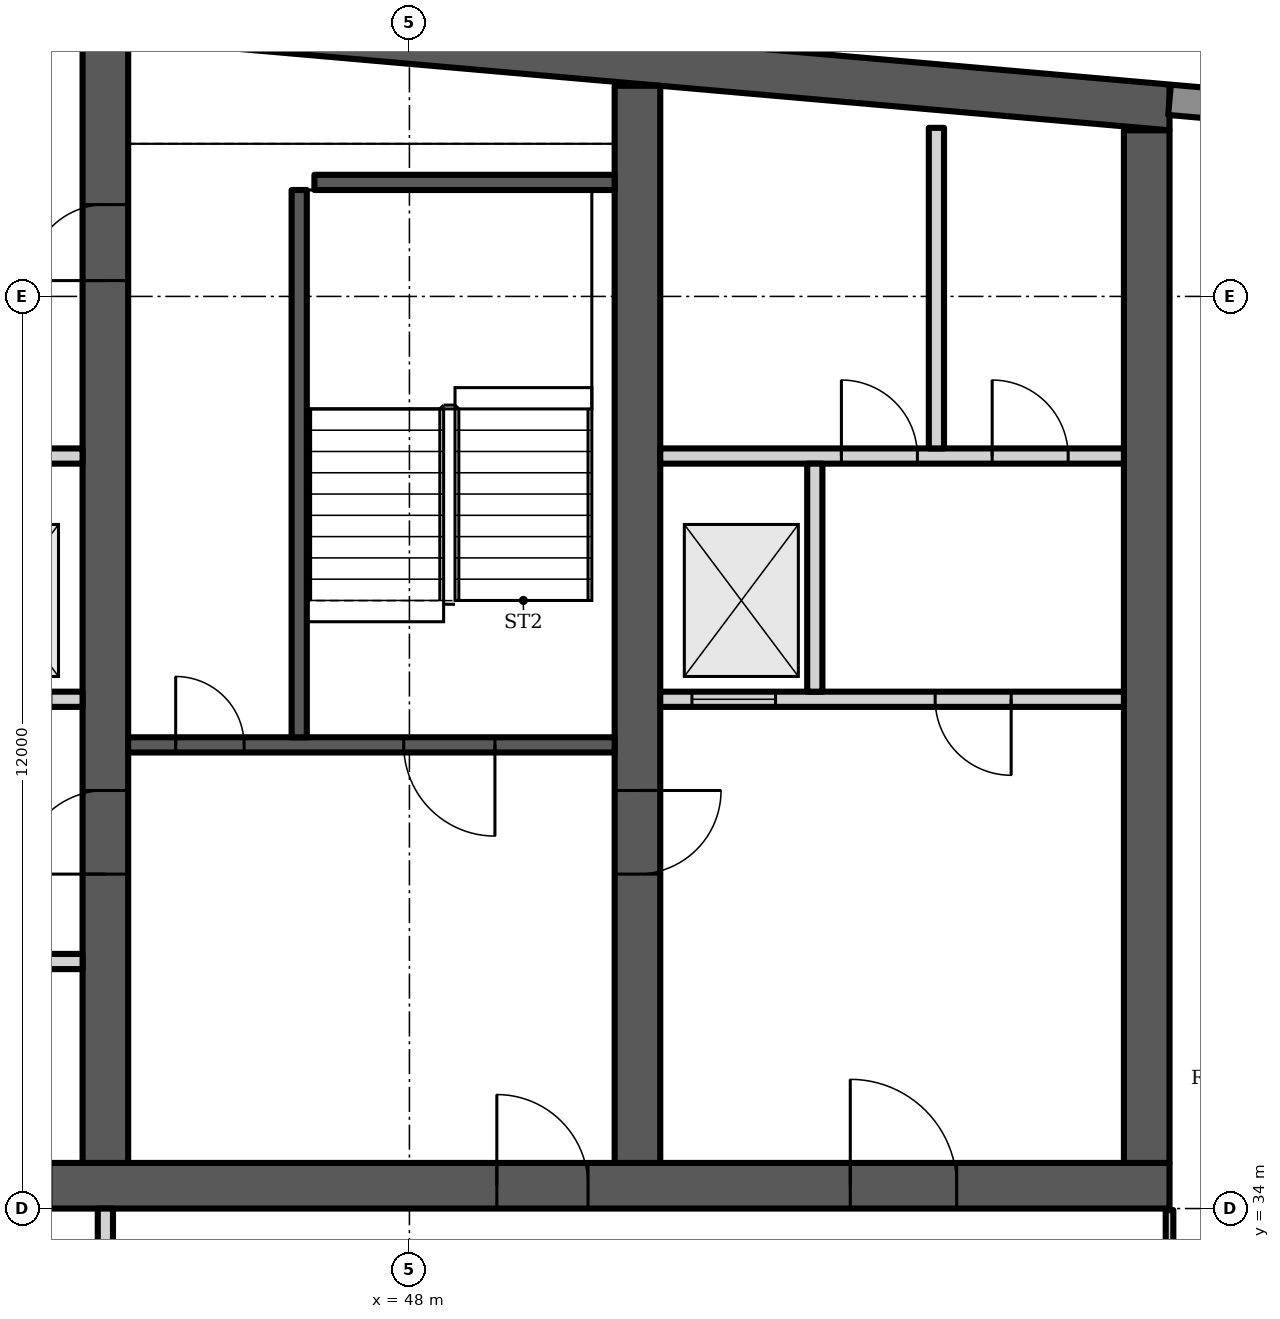
"""IFC4 building model, lengths in metres.
Left out: names, types, materials, properties, quantities, classifications, styles, units other than length and angle.
Written with IfcOpenShell. Run it as: python <this file> out.ifc"""

import sys

from ifc_helpers import new_model, si_unit, direction, frame, frame_2d, origin, place, context, subcontext, project, spatial, polyline, rectangle, outline, extrude, element, fill, save


model = new_model("IFC4")
c1 = context("Model", 3, precision=1e-05, world=origin(), true_north=direction((0.0, 1.0)))
c2 = subcontext(c1, "Body", "Model", "MODEL_VIEW")
j1 = project(units=[si_unit("LENGTHUNIT", "METRE"), si_unit("PLANEANGLEUNIT", "RADIAN")], contexts=[c1])
p1 = place(None, origin())
s1 = spatial("IfcSite", under=j1, at=p1, CompositionType="ELEMENT")
p2 = place(p1, origin())
s2 = spatial("IfcBuilding", under=s1, at=p2, CompositionType="ELEMENT")
p3 = place(p2, frame((0.0, 0.0, 257.5)))
s3 = spatial("IfcBuildingStorey", under=s2, at=p3, CompositionType="ELEMENT", Elevation=257.5)
p4 = place(p3, origin())
e1 = element("IfcWall", 1, at=p4, inside=s3, PredefinedType="SHEAR", context=c2, shape_type="SweptSolid", body=[
    extrude(outline(polyline([(23.0, 48.185), (40.5, 49.716), (58.0, 48.185), (58.0, 48.787), (40.5, 50.318), (23.0, 48.787), (23.0, 48.185)])), origin(), (0.0, 0.0, 1.0), 3.6),
])
p5 = place(p3, frame((23.0, 34.3, 0.0), z_axis=(0.0, 0.0, 1.0), x_axis=(1.0, 0.0, 0.0)))
e2 = element("IfcWall", 2, at=p5, inside=s3, PredefinedType="SHEAR", context=c2, shape_type="SweptSolid", body=[
    extrude(rectangle(XDim=35.0, YDim=0.6, at=frame_2d((17.5, 0.0))), origin(), (0.0, 0.0, 1.0), 3.6),
])
p6 = place(p5, frame((0.65, 0.0, 0.0)))
e3 = element("IfcOpeningElement", 3, at=p6, cuts=e2, PredefinedType="OPENING", context=c2, shape_type="SweptSolid", body=[
    extrude(rectangle(XDim=1.2, YDim=2.1, at=frame_2d((0.6, 1.05))), frame((0.0, 0.31, 0.0), z_axis=(0.0, -1.0, 0.0), x_axis=(1.0, 0.0, 0.0)), (0.0, 0.0, 1.0), 0.62),
])
p7 = place(p5, frame((7.717, 0.0, 0.0)))
e4 = element("IfcOpeningElement", 4, at=p7, cuts=e2, PredefinedType="OPENING", context=c2, shape_type="SweptSolid", body=[
    extrude(rectangle(XDim=1.1, YDim=2.1, at=frame_2d((0.55, 1.05))), frame((0.0, 0.31, 0.0), z_axis=(0.0, -1.0, 0.0), x_axis=(1.0, 0.0, 0.0)), (0.0, 0.0, 1.0), 0.62),
])
p8 = place(p5, frame((12.183, 0.0, 0.0)))
e5 = element("IfcOpeningElement", 5, at=p8, cuts=e2, PredefinedType="OPENING", context=c2, shape_type="SweptSolid", body=[
    extrude(rectangle(XDim=1.1, YDim=2.1, at=frame_2d((0.55, 1.05))), frame((0.0, 0.31, 0.0), z_axis=(0.0, -1.0, 0.0), x_axis=(1.0, 0.0, 0.0)), (0.0, 0.0, 1.0), 0.62),
])
p9 = place(p5, frame((9.8, 0.0, 0.0)))
e6 = element("IfcOpeningElement", 6, at=p9, cuts=e2, PredefinedType="OPENING", context=c2, shape_type="SweptSolid", body=[
    extrude(rectangle(XDim=1.4, YDim=2.1, at=frame_2d((0.7, 1.05))), frame((0.0, 0.31, 0.0), z_axis=(0.0, -1.0, 0.0), x_axis=(1.0, 0.0, 0.0)), (0.0, 0.0, 1.0), 0.62),
])
p10 = place(p5, frame((14.717, 0.0, 0.0)))
e7 = element("IfcOpeningElement", 7, at=p10, cuts=e2, PredefinedType="OPENING", context=c2, shape_type="SweptSolid", body=[
    extrude(rectangle(XDim=1.1, YDim=2.1, at=frame_2d((0.55, 1.05))), frame((0.0, 0.31, 0.0), z_axis=(0.0, -1.0, 0.0), x_axis=(1.0, 0.0, 0.0)), (0.0, 0.0, 1.0), 0.62),
])
p11 = place(p5, frame((16.95, 0.0, 0.0)))
e8 = element("IfcOpeningElement", 8, at=p11, cuts=e2, PredefinedType="OPENING", context=c2, shape_type="SweptSolid", body=[
    extrude(rectangle(XDim=1.1, YDim=2.1, at=frame_2d((0.55, 1.05))), frame((0.0, 0.31, 0.0), z_axis=(0.0, -1.0, 0.0), x_axis=(1.0, 0.0, 0.0)), (0.0, 0.0, 1.0), 0.62),
])
p12 = place(p5, frame((19.183, 0.0, 0.0)))
e9 = element("IfcOpeningElement", 9, at=p12, cuts=e2, PredefinedType="OPENING", context=c2, shape_type="SweptSolid", body=[
    extrude(rectangle(XDim=1.1, YDim=2.1, at=frame_2d((0.55, 1.05))), frame((0.0, 0.31, 0.0), z_axis=(0.0, -1.0, 0.0), x_axis=(1.0, 0.0, 0.0)), (0.0, 0.0, 1.0), 0.62),
])
p13 = place(p5, frame((26.15, 0.0, 0.0)))
e10 = element("IfcOpeningElement", 10, at=p13, cuts=e2, PredefinedType="OPENING", context=c2, shape_type="SweptSolid", body=[
    extrude(rectangle(XDim=1.2, YDim=2.1, at=frame_2d((0.6, 1.05))), frame((0.0, 0.31, 0.0), z_axis=(0.0, -1.0, 0.0), x_axis=(1.0, 0.0, 0.0)), (0.0, 0.0, 1.0), 0.62),
])
p14 = place(p5, frame((30.8, 0.0, 0.0)))
e11 = element("IfcOpeningElement", 11, at=p14, cuts=e2, PredefinedType="OPENING", context=c2, shape_type="SweptSolid", body=[
    extrude(rectangle(XDim=1.4, YDim=2.1, at=frame_2d((0.7, 1.05))), frame((0.0, 0.31, 0.0), z_axis=(0.0, -1.0, 0.0), x_axis=(1.0, 0.0, 0.0)), (0.0, 0.0, 1.0), 0.62),
])
p15 = place(p3, frame((44.0, 34.6, 0.0), z_axis=(0.0, 0.0, 1.0), x_axis=(0.0, 1.0, 0.0)))
e12 = element("IfcWall", 12, at=p15, inside=s3, PredefinedType="SHEAR", context=c2, shape_type="SweptSolid", body=[
    extrude(rectangle(XDim=14.784, YDim=0.6, at=frame_2d((7.392, 0.0))), origin(), (0.0, 0.0, 1.0), 3.6),
])
p16 = place(p15, frame((11.608, 0.0, 0.0)))
e13 = element("IfcOpeningElement", 13, at=p16, cuts=e12, PredefinedType="OPENING", context=c2, shape_type="SweptSolid", body=[
    extrude(rectangle(XDim=1.0, YDim=2.1, at=frame_2d((0.5, 1.05))), frame((0.0, 0.31, 0.0), z_axis=(0.0, -1.0, 0.0), x_axis=(1.0, 0.0, 0.0)), (0.0, 0.0, 1.0), 0.62),
])
p17 = place(p15, frame((3.8, 0.0, 0.0)))
e14 = element("IfcOpeningElement", 14, at=p17, cuts=e12, PredefinedType="OPENING", context=c2, shape_type="SweptSolid", body=[
    extrude(rectangle(XDim=1.1, YDim=2.1, at=frame_2d((0.55, 1.05))), frame((0.0, 0.31, 0.0), z_axis=(0.0, -1.0, 0.0), x_axis=(1.0, 0.0, 0.0)), (0.0, 0.0, 1.0), 0.62),
])
p18 = place(p3, frame((51.0, 34.6, 0.0), z_axis=(0.0, 0.0, 1.0), x_axis=(0.0, 1.0, 0.0)))
e15 = element("IfcWall", 15, at=p18, inside=s3, PredefinedType="SHEAR", context=c2, shape_type="SweptSolid", body=[
    extrude(rectangle(XDim=14.171, YDim=0.6, at=frame_2d((7.085, 0.0))), origin(), (0.0, 0.0, 1.0), 3.6),
])
p19 = place(p18, frame((3.8, 0.0, 0.0)))
e16 = element("IfcOpeningElement", 16, at=p19, cuts=e15, PredefinedType="OPENING", context=c2, shape_type="SweptSolid", body=[
    extrude(rectangle(XDim=1.1, YDim=2.1, at=frame_2d((0.55, 1.05))), frame((0.0, 0.31, 0.0), z_axis=(0.0, -1.0, 0.0), x_axis=(1.0, 0.0, 0.0)), (0.0, 0.0, 1.0), 0.62),
])
p20 = place(p3, frame((57.7, 34.6, 0.0), z_axis=(0.0, 0.0, 1.0), x_axis=(0.0, 1.0, 0.0)))
e17 = element("IfcWall", 17, at=p20, inside=s3, PredefinedType="SHEAR", context=c2, shape_type="SweptSolid", body=[
    extrude(rectangle(XDim=13.585, YDim=0.6, at=frame_2d((6.792, 0.0))), origin(), (0.0, 0.0, 1.0), 3.6),
])
p21 = place(p3, frame((60.983, 48.326, 0.0), z_axis=(0.0, 0.0, 1.0), x_axis=(-0.996194, 0.087168, 0.0)))
e18 = element("IfcWall", 18, at=p21, inside=s3, PredefinedType="SOLIDWALL", context=c2, shape_type="SweptSolid", body=[
    extrude(rectangle(XDim=2.994, YDim=0.4, at=frame_2d((1.497, 0.0))), origin(), (0.0, 0.0, 1.0), 3.2),
])
p22 = place(p3, frame((37.3, 40.7, 0.0), z_axis=(0.0, 0.0, 1.0), x_axis=(1.0, 0.0, 0.0)))
e19 = element("IfcWall", 19, at=p22, inside=s3, PredefinedType="PARTITIONING", context=c2, shape_type="SweptSolid", body=[
    extrude(rectangle(XDim=6.4, YDim=0.2, at=frame_2d((3.2, 0.0))), origin(), (0.0, 0.0, 1.0), 3.2),
])
p23 = place(p22, frame((0.417, 0.0, 0.0)))
e20 = element("IfcOpeningElement", 20, at=p23, cuts=e19, PredefinedType="OPENING", context=c2, shape_type="SweptSolid", body=[
    extrude(rectangle(XDim=1.1, YDim=2.1, at=frame_2d((0.55, 1.05))), frame((0.0, 0.11, 0.0), z_axis=(0.0, -1.0, 0.0), x_axis=(1.0, 0.0, 0.0)), (0.0, 0.0, 1.0), 0.22),
])
p24 = place(p22, frame((2.65, 0.0, 0.0)))
e21 = element("IfcOpeningElement", 21, at=p24, cuts=e19, PredefinedType="OPENING", context=c2, shape_type="SweptSolid", body=[
    extrude(rectangle(XDim=1.1, YDim=2.1, at=frame_2d((0.55, 1.05))), frame((0.0, 0.11, 0.0), z_axis=(0.0, -1.0, 0.0), x_axis=(1.0, 0.0, 0.0)), (0.0, 0.0, 1.0), 0.22),
])
p25 = place(p22, frame((4.883, 0.0, 0.0)))
e22 = element("IfcOpeningElement", 22, at=p25, cuts=e19, PredefinedType="OPENING", context=c2, shape_type="SweptSolid", body=[
    extrude(rectangle(XDim=1.1, YDim=2.1, at=frame_2d((0.55, 1.05))), frame((0.0, 0.11, 0.0), z_axis=(0.0, -1.0, 0.0), x_axis=(1.0, 0.0, 0.0)), (0.0, 0.0, 1.0), 0.22),
])
p26 = place(p3, frame((0.0, 0.0, -0.0)))
e23 = element("IfcWall", 23, at=p26, inside=s3, PredefinedType="PARTITIONING", context=c2, shape_type="SweptSolid", body=[
    extrude(outline(polyline([(41.567, 37.1), (39.433, 37.1), (39.433, 34.6), (39.233, 34.6), (39.233, 37.45), (37.3, 37.45), (37.3, 37.65), (39.233, 37.65), (39.433, 37.65), (39.433, 37.3), (41.567, 37.3), (41.567, 37.35), (41.767, 37.35), (43.7, 37.35), (43.7, 37.15), (41.767, 37.15), (41.767, 34.6), (41.567, 34.6), (41.567, 37.1)])), origin(), (0.0, 0.0, 1.0), 3.2),
])
p27 = place(p3, frame((0.0, 0.0, -0.0)))
e24 = element("IfcWall", 24, at=p27, inside=s3, PredefinedType="PARTITIONING", context=c2, shape_type="SweptSolid", body=[
    extrude(outline(polyline([(39.433, 40.8), (39.233, 40.8), (39.233, 43.8), (37.3, 43.8), (37.3, 44.0), (43.7, 44.0), (43.7, 43.8), (41.767, 43.8), (41.767, 40.8), (41.567, 40.8), (41.567, 43.8), (39.433, 43.8), (39.433, 40.8)])), origin(), (0.0, 0.0, 1.0), 3.2),
])
p28 = place(p3, frame((44.3, 40.1, 0.0), z_axis=(0.0, 0.0, 1.0), x_axis=(1.0, 0.0, 0.0)))
e25 = element("IfcWall", 25, at=p28, inside=s3, PredefinedType="SHEAR", context=c2, shape_type="SweptSolid", body=[
    extrude(rectangle(XDim=6.4, YDim=0.2, at=frame_2d((3.2, 0.0))), origin(), (0.0, 0.0, 1.0), 3.2),
])
p29 = place(p28, frame((3.625, 0.0, 0.0)))
e26 = element("IfcOpeningElement", 26, at=p29, cuts=e25, PredefinedType="OPENING", context=c2, shape_type="SweptSolid", body=[
    extrude(rectangle(XDim=1.2, YDim=2.1, at=frame_2d((0.6, 1.05))), frame((0.0, 0.11, 0.0), z_axis=(0.0, -1.0, 0.0), x_axis=(1.0, 0.0, 0.0)), (0.0, 0.0, 1.0), 0.22),
])
p30 = place(p28, frame((0.625, 0.0, 0.0)))
e27 = element("IfcOpeningElement", 27, at=p30, cuts=e25, PredefinedType="OPENING", context=c2, shape_type="SweptSolid", body=[
    extrude(rectangle(XDim=0.9, YDim=2.1, at=frame_2d((0.45, 1.05))), frame((0.0, 0.11, 0.0), z_axis=(0.0, -1.0, 0.0), x_axis=(1.0, 0.0, 0.0)), (0.0, 0.0, 1.0), 0.22),
])
p31 = place(p3, frame((46.55, 40.2, 0.0), z_axis=(0.0, 0.0, 1.0), x_axis=(0.0, 1.0, 0.0)))
e28 = element("IfcWall", 28, at=p31, inside=s3, PredefinedType="SHEAR", context=c2, shape_type="SweptSolid", body=[
    extrude(rectangle(XDim=7.2, YDim=0.2, at=frame_2d((3.6, 0.0))), origin(), (0.0, 0.0, 1.0), 3.2),
])
p32 = place(p3, frame((46.75, 47.5, 0.0), z_axis=(0.0, 0.0, 1.0), x_axis=(1.0, 0.0, 0.0)))
e29 = element("IfcWall", 29, at=p32, inside=s3, PredefinedType="SHEAR", context=c2, shape_type="SweptSolid", body=[
    extrude(rectangle(XDim=3.95, YDim=0.2, at=frame_2d((1.975, 0.0))), origin(), (0.0, 0.0, 1.0), 3.2),
])
p33 = place(p3, frame((51.3, 40.7, 0.0), z_axis=(0.0, 0.0, 1.0), x_axis=(1.0, 0.0, 0.0)))
e30 = element("IfcWall", 30, at=p33, inside=s3, PredefinedType="PARTITIONING", context=c2, shape_type="SweptSolid", body=[
    extrude(rectangle(XDim=6.1, YDim=0.2, at=frame_2d((3.05, 0.0))), origin(), (0.0, 0.0, 1.0), 3.2),
])
p34 = place(p33, frame((0.417, 0.0, 0.0)))
e31 = element("IfcOpeningElement", 31, at=p34, cuts=e30, PredefinedType="OPENING", context=c2, shape_type="SweptSolid", body=[
    extrude(rectangle(XDim=1.1, YDim=2.1, at=frame_2d((0.55, 1.05))), frame((0.0, 0.11, 0.0), z_axis=(0.0, -1.0, 0.0), x_axis=(1.0, 0.0, 0.0)), (0.0, 0.0, 1.0), 0.22),
])
p35 = place(p33, frame((3.617, 0.0, 0.0)))
e32 = element("IfcOpeningElement", 32, at=p35, cuts=e30, PredefinedType="OPENING", context=c2, shape_type="SweptSolid", body=[
    extrude(rectangle(XDim=1.0, YDim=2.1, at=frame_2d((0.5, 1.05))), frame((0.0, 0.11, 0.0), z_axis=(0.0, -1.0, 0.0), x_axis=(1.0, 0.0, 0.0)), (0.0, 0.0, 1.0), 0.22),
])
p36 = place(p3, frame((51.3, 43.9, 0.0), z_axis=(0.0, 0.0, 1.0), x_axis=(1.0, 0.0, 0.0)))
e33 = element("IfcWall", 33, at=p36, inside=s3, PredefinedType="PARTITIONING", context=c2, shape_type="SweptSolid", body=[
    extrude(rectangle(XDim=6.1, YDim=0.2, at=frame_2d((3.05, 0.0))), origin(), (0.0, 0.0, 1.0), 3.2),
])
p37 = place(p36, frame((2.383, 0.0, 0.0)))
e34 = element("IfcOpeningElement", 34, at=p37, cuts=e33, PredefinedType="OPENING", context=c2, shape_type="SweptSolid", body=[
    extrude(rectangle(XDim=1.0, YDim=2.1, at=frame_2d((0.5, 1.05))), frame((0.0, 0.11, 0.0), z_axis=(0.0, -1.0, 0.0), x_axis=(1.0, 0.0, 0.0)), (0.0, 0.0, 1.0), 0.22),
])
p38 = place(p36, frame((4.367, 0.0, 0.0)))
e35 = element("IfcOpeningElement", 35, at=p38, cuts=e33, PredefinedType="OPENING", context=c2, shape_type="SweptSolid", body=[
    extrude(rectangle(XDim=1.0, YDim=2.1, at=frame_2d((0.5, 1.05))), frame((0.0, 0.11, 0.0), z_axis=(0.0, -1.0, 0.0), x_axis=(1.0, 0.0, 0.0)), (0.0, 0.0, 1.0), 0.22),
])
p39 = place(p3, frame((0.0, 0.0, -0.0)))
e36 = element("IfcWall", 36, at=p39, inside=s3, PredefinedType="PARTITIONING", context=c2, shape_type="SweptSolid", body=[
    extrude(outline(polyline([(53.433, 40.8), (53.433, 43.8), (53.233, 43.8), (53.233, 40.8), (53.433, 40.8)])), origin(), (0.0, 0.0, 1.0), 3.2),
])
p40 = place(p3, frame((54.933, 44.0, 0.0), z_axis=(0.0, 0.0, 1.0), x_axis=(0.0, 1.0, 0.0)))
e37 = element("IfcWall", 37, at=p40, inside=s3, PredefinedType="PARTITIONING", context=c2, shape_type="SweptSolid", body=[
    extrude(rectangle(XDim=4.218, YDim=0.2, at=frame_2d((2.109, 0.0))), origin(), (0.0, 0.0, 1.0), 3.2),
])
p41 = place(p3, frame((44.0, 30.5, 0.0), z_axis=(0.0, 0.0, 1.0), x_axis=(0.0, 1.0, 0.0)))
e38 = element("IfcWall", 38, at=p41, inside=s3, PredefinedType="PARTITIONING", context=c2, shape_type="SweptSolid", body=[
    extrude(rectangle(XDim=3.5, YDim=0.2, at=frame_2d((1.75, 0.0))), origin(), (0.0, 0.0, 1.0), 3.2),
])
p42 = place(p41, frame((1.2, 0.0, 0.0)))
e39 = element("IfcOpeningElement", 39, at=p42, cuts=e38, PredefinedType="OPENING", context=c2, shape_type="SweptSolid", body=[
    extrude(rectangle(XDim=1.1, YDim=2.1, at=frame_2d((0.55, 1.05))), frame((0.0, 0.11, 0.0), z_axis=(0.0, -1.0, 0.0), x_axis=(1.0, 0.0, 0.0)), (0.0, 0.0, 1.0), 0.22),
])
p43 = place(p3, frame((58.0, 30.56, 0.0), z_axis=(0.0, 0.0, 1.0), x_axis=(0.0, 1.0, 0.0)))
e40 = element("IfcWall", 40, at=p43, inside=s3, PredefinedType="PARTITIONING", context=c2, shape_type="SweptSolid", body=[
    extrude(rectangle(XDim=3.42, YDim=0.1, at=frame_2d((1.71, 0.0))), origin(), (0.0, 0.0, 1.0), 3.2),
])
p44 = place(p16, origin())
e41 = element("IfcDoor", 41, at=p44, inside=s3, OperationType="SINGLE_SWING_LEFT", PredefinedType="DOOR", context=c2, shape_type="SweptSolid", body=[
    extrude(rectangle(XDim=1.0, YDim=2.1, at=frame_2d((0.5, 1.05))), frame((0.0, 0.025, 0.0), z_axis=(0.0, -1.0, 0.0), x_axis=(1.0, 0.0, 0.0)), (0.0, 0.0, 1.0), 0.05),
])
fill(e13, e41)
p45 = place(p29, origin())
e42 = element("IfcDoor", 42, at=p45, inside=s3, OperationType="SINGLE_SWING_RIGHT", PredefinedType="DOOR", context=c2, shape_type="SweptSolid", body=[
    extrude(rectangle(XDim=1.2, YDim=2.1, at=frame_2d((0.6, 1.05))), frame((0.0, 0.025, 0.0), z_axis=(0.0, -1.0, 0.0), x_axis=(1.0, 0.0, 0.0)), (0.0, 0.0, 1.0), 0.05),
])
fill(e26, e42)
p46 = place(p30, origin())
e43 = element("IfcDoor", 43, at=p46, inside=s3, OperationType="SINGLE_SWING_LEFT", PredefinedType="DOOR", context=c2, shape_type="SweptSolid", body=[
    extrude(rectangle(XDim=0.9, YDim=2.1, at=frame_2d((0.45, 1.05))), frame((0.0, 0.025, 0.0), z_axis=(0.0, -1.0, 0.0), x_axis=(1.0, 0.0, 0.0)), (0.0, 0.0, 1.0), 0.05),
])
fill(e27, e43)
p47 = place(p13, origin())
e44 = element("IfcDoor", 44, at=p47, inside=s3, OperationType="SINGLE_SWING_LEFT", PredefinedType="DOOR", context=c2, shape_type="SweptSolid", body=[
    extrude(rectangle(XDim=1.2, YDim=2.1, at=frame_2d((0.6, 1.05))), frame((0.0, 0.025, 0.0), z_axis=(0.0, -1.0, 0.0), x_axis=(1.0, 0.0, 0.0)), (0.0, 0.0, 1.0), 0.05),
])
fill(e10, e44)
p48 = place(p14, origin())
e45 = element("IfcDoor", 45, at=p48, inside=s3, OperationType="DOUBLE_DOOR_SINGLE_SWING", PredefinedType="DOOR", context=c2, shape_type="SweptSolid", body=[
    extrude(rectangle(XDim=1.4, YDim=2.1, at=frame_2d((0.7, 1.05))), frame((0.0, 0.025, 0.0), z_axis=(0.0, -1.0, 0.0), x_axis=(1.0, 0.0, 0.0)), (0.0, 0.0, 1.0), 0.05),
])
fill(e11, e45)
p49 = place(p34, origin())
e46 = element("IfcDoor", 46, at=p49, inside=s3, OperationType="DOUBLE_DOOR_SLIDING", PredefinedType="DOOR", context=c2, shape_type="SweptSolid", body=[
    extrude(rectangle(XDim=1.1, YDim=2.1, at=frame_2d((0.55, 1.05))), frame((0.0, 0.025, 0.0), z_axis=(0.0, -1.0, 0.0), x_axis=(1.0, 0.0, 0.0)), (0.0, 0.0, 1.0), 0.05),
])
fill(e31, e46)
p50 = place(p35, origin())
e47 = element("IfcDoor", 47, at=p50, inside=s3, OperationType="SINGLE_SWING_RIGHT", PredefinedType="DOOR", context=c2, shape_type="SweptSolid", body=[
    extrude(rectangle(XDim=1.0, YDim=2.1, at=frame_2d((0.5, 1.05))), frame((0.0, 0.025, 0.0), z_axis=(0.0, -1.0, 0.0), x_axis=(1.0, 0.0, 0.0)), (0.0, 0.0, 1.0), 0.05),
])
fill(e32, e47)
p51 = place(p37, origin())
e48 = element("IfcDoor", 48, at=p51, inside=s3, OperationType="SINGLE_SWING_LEFT", PredefinedType="DOOR", context=c2, shape_type="SweptSolid", body=[
    extrude(rectangle(XDim=1.0, YDim=2.1, at=frame_2d((0.5, 1.05))), frame((0.0, 0.025, 0.0), z_axis=(0.0, -1.0, 0.0), x_axis=(1.0, 0.0, 0.0)), (0.0, 0.0, 1.0), 0.05),
])
fill(e34, e48)
p52 = place(p38, origin())
e49 = element("IfcDoor", 49, at=p52, inside=s3, OperationType="SINGLE_SWING_LEFT", PredefinedType="DOOR", context=c2, shape_type="SweptSolid", body=[
    extrude(rectangle(XDim=1.0, YDim=2.1, at=frame_2d((0.5, 1.05))), frame((0.0, 0.025, 0.0), z_axis=(0.0, -1.0, 0.0), x_axis=(1.0, 0.0, 0.0)), (0.0, 0.0, 1.0), 0.05),
])
fill(e35, e49)
p53 = place(p17, origin())
e50 = element("IfcDoor", 50, at=p53, inside=s3, OperationType="SINGLE_SWING_LEFT", PredefinedType="DOOR", context=c2, shape_type="SweptSolid", body=[
    extrude(rectangle(XDim=1.1, YDim=2.1, at=frame_2d((0.55, 1.05))), frame((0.0, 0.025, 0.0), z_axis=(0.0, -1.0, 0.0), x_axis=(1.0, 0.0, 0.0)), (0.0, 0.0, 1.0), 0.05),
])
fill(e14, e50)
p54 = place(p19, origin())
e51 = element("IfcDoor", 51, at=p54, inside=s3, OperationType="SINGLE_SWING_RIGHT", PredefinedType="DOOR", context=c2, shape_type="SweptSolid", body=[
    extrude(rectangle(XDim=1.1, YDim=2.1, at=frame_2d((0.55, 1.05))), frame((0.0, 0.025, 0.0), z_axis=(0.0, -1.0, 0.0), x_axis=(1.0, 0.0, 0.0)), (0.0, 0.0, 1.0), 0.05),
])
fill(e16, e51)
save(model, sys.argv[1])
